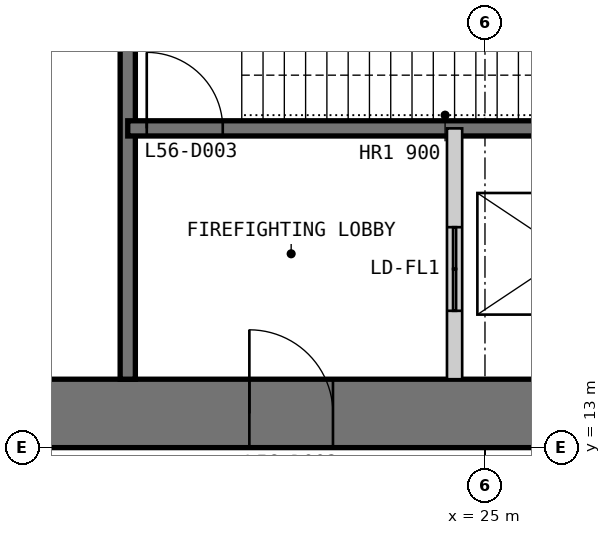
"""IFC4 building model, lengths in metres.
Left out: names, types, materials, properties, quantities, classifications, styles, units other than length and angle.
Written with IfcOpenShell. Run it as: python <this file> out.ifc"""

import sys

from ifc_helpers import new_model, si_unit, direction, frame, frame_2d, origin, place, context, subcontext, project, spatial, polyline, rectangle, outline, extrude, element, fill, save


model = new_model("IFC4")
c1 = context("Model", 3, precision=1e-05, world=origin(), true_north=direction((0.0, 1.0)))
c2 = subcontext(c1, "Body", "Model", "MODEL_VIEW")
j1 = project(units=[si_unit("LENGTHUNIT", "METRE"), si_unit("PLANEANGLEUNIT", "RADIAN")], contexts=[c1])
p1 = place(None, origin())
s1 = spatial("IfcSite", under=j1, at=p1, CompositionType="ELEMENT")
p2 = place(p1, origin())
s2 = spatial("IfcBuilding", under=s1, at=p2, CompositionType="ELEMENT")
p3 = place(p2, frame((0.0, 0.0, 239.8)))
s3 = spatial("IfcBuildingStorey", under=s2, at=p3, CompositionType="ELEMENT", Elevation=239.8)
p4 = place(p3, frame((13.0, 13.45, 0.0), z_axis=(0.0, 0.0, 1.0), x_axis=(1.0, 0.0, 0.0)))
e1 = element("IfcWall", 1, at=p4, inside=s3, PredefinedType="SHEAR", context=c2, shape_type="SweptSolid", body=[
    extrude(outline(polyline([(0.0, -0.45), (24.0, -0.45), (23.1, 0.45), (0.9, 0.45), (0.0, -0.45)])), origin(), (0.0, 0.0, 1.0), 6.0),
])
p5 = place(p4, frame((4.9, 0.0, 0.0)))
e2 = element("IfcOpeningElement", 2, at=p5, cuts=e1, PredefinedType="OPENING", context=c2, shape_type="SweptSolid", body=[
    extrude(rectangle(XDim=1.0, YDim=2.2, at=frame_2d((0.5, 1.1))), frame((0.0, 0.46, 0.0), z_axis=(0.0, -1.0, 0.0), x_axis=(1.0, 0.0, 0.0)), (0.0, 0.0, 1.0), 0.92),
])
p6 = place(p4, frame((8.9, 0.0, 0.0)))
e3 = element("IfcOpeningElement", 3, at=p6, cuts=e1, PredefinedType="OPENING", context=c2, shape_type="SweptSolid", body=[
    extrude(rectangle(XDim=1.1, YDim=2.2, at=frame_2d((0.55, 1.1))), frame((0.0, 0.46, 0.0), z_axis=(0.0, -1.0, 0.0), x_axis=(1.0, 0.0, 0.0)), (0.0, 0.0, 1.0), 0.92),
])
p7 = place(p4, frame((15.05, 0.0, 0.0)))
e4 = element("IfcOpeningElement", 4, at=p7, cuts=e1, PredefinedType="OPENING", context=c2, shape_type="SweptSolid", body=[
    extrude(rectangle(XDim=0.9, YDim=2.2, at=frame_2d((0.45, 1.1))), frame((0.0, 0.46, 0.0), z_axis=(0.0, -1.0, 0.0), x_axis=(1.0, 0.0, 0.0)), (0.0, 0.0, 1.0), 0.92),
])
p8 = place(p4, frame((17.9, 0.0, 0.0)))
e5 = element("IfcOpeningElement", 5, at=p8, cuts=e1, PredefinedType="OPENING", context=c2, shape_type="SweptSolid", body=[
    extrude(rectangle(XDim=1.0, YDim=2.2, at=frame_2d((0.5, 1.1))), frame((0.0, 0.46, 0.0), z_axis=(0.0, -1.0, 0.0), x_axis=(1.0, 0.0, 0.0)), (0.0, 0.0, 1.0), 0.92),
])
p9 = place(p4, frame((21.4, 0.0, 0.0)))
e6 = element("IfcOpeningElement", 6, at=p9, cuts=e1, PredefinedType="OPENING", context=c2, shape_type="SweptSolid", body=[
    extrude(rectangle(XDim=1.0, YDim=2.2, at=frame_2d((0.5, 1.1))), frame((0.0, 0.46, 0.0), z_axis=(0.0, -1.0, 0.0), x_axis=(1.0, 0.0, 0.0)), (0.0, 0.0, 1.0), 0.92),
])
p10 = place(p3, frame((20.3, 13.9, 0.0), z_axis=(0.0, 0.0, 1.0), x_axis=(0.0, 1.0, 0.0)))
e7 = element("IfcWall", 7, at=p10, inside=s3, PredefinedType="SOLIDWALL", context=c2, shape_type="SweptSolid", body=[
    extrude(rectangle(XDim=16.1, YDim=0.2, at=frame_2d((8.05, 0.0))), origin(), (0.0, 0.0, 1.0), 5.8),
])
p11 = place(p10, frame((6.65, 0.0, 0.0)))
e8 = element("IfcOpeningElement", 8, at=p11, cuts=e7, PredefinedType="OPENING", context=c2, shape_type="SweptSolid", body=[
    extrude(rectangle(XDim=0.9, YDim=2.2, at=frame_2d((0.45, 1.1))), frame((0.0, 0.11, 0.0), z_axis=(0.0, -1.0, 0.0), x_axis=(1.0, 0.0, 0.0)), (0.0, 0.0, 1.0), 0.22),
])
p12 = place(p10, frame((9.35, 0.0, 0.0)))
e9 = element("IfcOpeningElement", 9, at=p12, cuts=e7, PredefinedType="OPENING", context=c2, shape_type="SweptSolid", body=[
    extrude(rectangle(XDim=0.9, YDim=2.2, at=frame_2d((0.45, 1.1))), frame((0.0, 0.11, 0.0), z_axis=(0.0, -1.0, 0.0), x_axis=(1.0, 0.0, 0.0)), (0.0, 0.0, 1.0), 0.22),
])
p13 = place(p10, frame((13.35, 0.0, 0.0)))
e10 = element("IfcOpeningElement", 10, at=p13, cuts=e7, PredefinedType="OPENING", context=c2, shape_type="SweptSolid", body=[
    extrude(rectangle(XDim=0.9, YDim=2.2, at=frame_2d((0.45, 1.1))), frame((0.0, 0.11, 0.0), z_axis=(0.0, -1.0, 0.0), x_axis=(1.0, 0.0, 0.0)), (0.0, 0.0, 1.0), 0.22),
])
p14 = place(p3, frame((20.3, 17.2, 0.0), z_axis=(0.0, 0.0, 1.0), x_axis=(1.0, 0.0, 0.0)))
e11 = element("IfcWall", 11, at=p14, inside=s3, PredefinedType="SOLIDWALL", context=c2, shape_type="SweptSolid", body=[
    extrude(rectangle(XDim=9.4, YDim=0.2, at=frame_2d((4.7, 0.0))), origin(), (0.0, 0.0, 1.0), 5.8),
])
p15 = place(p14, frame((0.25, 0.0, 0.0)))
e12 = element("IfcOpeningElement", 12, at=p15, cuts=e11, PredefinedType="OPENING", context=c2, shape_type="SweptSolid", body=[
    extrude(rectangle(XDim=1.0, YDim=2.2, at=frame_2d((0.5, 1.1))), frame((0.0, 0.11, 0.0), z_axis=(0.0, -1.0, 0.0), x_axis=(1.0, 0.0, 0.0)), (0.0, 0.0, 1.0), 0.22),
])
p16 = place(p3, frame((24.6, 13.9, 0.0), z_axis=(0.0, 0.0, 1.0), x_axis=(0.0, 1.0, 0.0)))
e13 = element("IfcWall", 13, at=p16, inside=s3, PredefinedType="PARTITIONING", context=c2, shape_type="SweptSolid", body=[
    extrude(rectangle(XDim=3.3, YDim=0.2, at=frame_2d((1.65, 0.0))), origin(), (0.0, 0.0, 1.0), 5.8),
])
p17 = place(p16, frame((0.9, 0.0, 0.0)))
e14 = element("IfcOpeningElement", 14, at=p17, cuts=e13, PredefinedType="OPENING", context=c2, shape_type="SweptSolid", body=[
    extrude(rectangle(XDim=1.1, YDim=2.2, at=frame_2d((0.55, 1.1))), frame((0.0, 0.11, 0.0), z_axis=(0.0, -1.0, 0.0), x_axis=(1.0, 0.0, 0.0)), (0.0, 0.0, 1.0), 0.22),
])
p18 = place(p6, origin())
e15 = element("IfcDoor", 15, at=p18, inside=s3, OperationType="SINGLE_SWING_LEFT", PredefinedType="DOOR", context=c2, shape_type="SweptSolid", body=[
    extrude(rectangle(XDim=1.1, YDim=2.2, at=frame_2d((0.55, 1.1))), frame((0.0, 0.025, 0.0), z_axis=(0.0, -1.0, 0.0), x_axis=(1.0, 0.0, 0.0)), (0.0, 0.0, 1.0), 0.05),
    extrude(outline(polyline([(0.0, 0.0), (0.04, 0.0), (0.04, 2.16), (1.06, 2.16), (1.06, 0.0), (1.1, 0.0), (1.1, 2.2), (0.0, 2.2), (0.0, 0.0)])), frame((0.0, 0.3, 0.0), z_axis=(0.0, -1.0, 0.0), x_axis=(1.0, 0.0, 0.0)), (0.0, 0.0, 1.0), 0.6),
])
fill(e3, e15)
p19 = place(p15, origin())
e16 = element("IfcDoor", 16, at=p19, inside=s3, OperationType="SINGLE_SWING_LEFT", PredefinedType="DOOR", context=c2, shape_type="SweptSolid", body=[
    extrude(rectangle(XDim=1.0, YDim=2.2, at=frame_2d((0.5, 1.1))), frame((0.0, 0.025, 0.0), z_axis=(0.0, -1.0, 0.0), x_axis=(1.0, 0.0, 0.0)), (0.0, 0.0, 1.0), 0.05),
])
fill(e12, e16)
p20 = place(p17, origin())
e17 = element("IfcDoor", 17, at=p20, inside=s3, OperationType="DOUBLE_DOOR_SLIDING", PredefinedType="DOOR", context=c2, shape_type="SweptSolid", body=[
    extrude(rectangle(XDim=1.1, YDim=2.2, at=frame_2d((0.55, 1.1))), frame((0.0, 0.025, 0.0), z_axis=(0.0, -1.0, 0.0), x_axis=(1.0, 0.0, 0.0)), (0.0, 0.0, 1.0), 0.05),
])
fill(e14, e17)
save(model, sys.argv[1])
